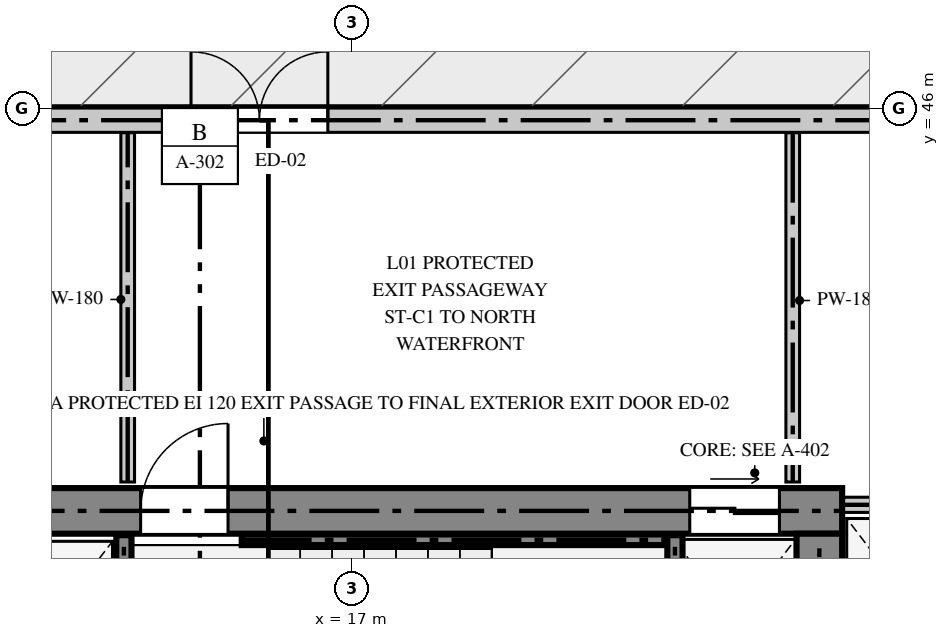
"""IFC4 building model, lengths in metres.
Left out: names, types, materials, properties, quantities, classifications, styles, units other than length and angle.
Written with IfcOpenShell. Run it as: python <this file> out.ifc"""

import sys

from ifc_helpers import new_model, si_unit, direction, frame, frame_2d, origin, place, context, subcontext, project, spatial, rectangle, extrude, element, fill, save


model = new_model("IFC4")
c1 = context("Model", 3, precision=1e-05, world=origin(), true_north=direction((0.0, 1.0)))
c2 = subcontext(c1, "Body", "Model", "MODEL_VIEW")
j1 = project(units=[si_unit("LENGTHUNIT", "METRE"), si_unit("PLANEANGLEUNIT", "RADIAN")], contexts=[c1])
p1 = place(None, origin())
s1 = spatial("IfcSite", under=j1, at=p1, CompositionType="ELEMENT")
p2 = place(p1, origin())
s2 = spatial("IfcBuilding", under=s1, at=p2, CompositionType="ELEMENT")
p3 = place(p2, origin())
s3 = spatial("IfcBuildingStorey", under=s2, at=p3, CompositionType="ELEMENT", Elevation=0.0)
p4 = place(p3, frame((5.4, 40.7, 0.0), z_axis=(0.0, 0.0, 1.0), x_axis=(1.0, 0.0, 0.0)))
e1 = element("IfcWall", 1, at=p4, inside=s3, PredefinedType="SHEAR", context=c2, shape_type="SweptSolid", body=[
    extrude(rectangle(XDim=18.05, YDim=0.6, at=frame_2d((9.025, 0.0))), origin(), (0.0, 0.0, 1.0), 5.4),
])
p5 = place(p4, frame((8.82, 0.0, 0.0)))
e2 = element("IfcOpeningElement", 2, at=p5, cuts=e1, PredefinedType="OPENING", context=c2, shape_type="SweptSolid", body=[
    extrude(rectangle(XDim=1.15, YDim=2.2, at=frame_2d((0.575, 1.1))), frame((0.0, 0.31, 0.0), z_axis=(0.0, -1.0, 0.0), x_axis=(1.0, 0.0, 0.0)), (0.0, 0.0, 1.0), 0.62),
])
p6 = place(p4, frame((16.045, 0.0, 0.0)))
e3 = element("IfcOpeningElement", 3, at=p6, cuts=e1, PredefinedType="OPENING", context=c2, shape_type="SweptSolid", body=[
    extrude(rectangle(XDim=1.18, YDim=2.25, at=frame_2d((0.59, 1.125))), frame((0.0, 0.31, 0.0), z_axis=(0.0, -1.0, 0.0), x_axis=(1.0, 0.0, 0.0)), (0.0, 0.0, 1.0), 0.62),
])
p7 = place(p3, frame((23.15, 32.1, 0.0), z_axis=(0.0, 0.0, 1.0), x_axis=(0.0, 1.0, 0.0)))
e4 = element("IfcWall", 4, at=p7, inside=s3, PredefinedType="SHEAR", context=c2, shape_type="SweptSolid", body=[
    extrude(rectangle(XDim=8.3, YDim=0.6, at=frame_2d((4.15, 0.0))), origin(), (0.0, 0.0, 1.0), 5.4),
])
for number, where, z_axis, x_axis in (
    (5, (14.0, 32.12, 0.0), (0.0, 0.0, 1.0), (0.0, 1.0, 0.0)),
    (6, (21.25, 32.12, 0.0), (0.0, 0.0, 1.0), (0.0, 1.0, 0.0)),
):
    element("IfcWall", number, at=place(p3, frame(where, z_axis=z_axis, x_axis=x_axis)), inside=s3, PredefinedType="SHEAR", context=c2, shape_type="SweptSolid", body=[
        extrude(rectangle(XDim=8.26, YDim=0.2, at=frame_2d((4.13, 0.0))), origin(), (0.0, 0.0, 1.0), 5.4),
    ])
p8 = place(p3, frame((15.55, 40.32, 0.0), z_axis=(0.0, 0.0, 1.0), x_axis=(1.0, 0.0, 0.0)))
e7 = element("IfcWall", 7, at=p8, inside=s3, PredefinedType="SHEAR", context=c2, shape_type="SweptSolid", body=[
    extrude(rectangle(XDim=5.58, YDim=0.14, at=frame_2d((2.79, 0.0))), origin(), (0.0, 0.0, 1.0), 5.4),
])
p9 = place(p3, frame((2.66, 45.84, 0.0), z_axis=(0.0, 0.0, 1.0), x_axis=(1.0, 0.0, 0.0)))
e8 = element("IfcWall", 8, at=p9, inside=s3, PredefinedType="STANDARD", context=c2, shape_type="SweptSolid", body=[
    extrude(rectangle(XDim=54.68, YDim=0.32, at=frame_2d((27.34, 0.0))), origin(), (0.0, 0.0, 1.0), 5.08),
])
p10 = place(p9, frame((12.223, 0.0, 0.0)))
e9 = element("IfcOpeningElement", 9, at=p10, cuts=e8, PredefinedType="OPENING", context=c2, shape_type="SweptSolid", body=[
    extrude(rectangle(XDim=1.8, YDim=2.4, at=frame_2d((0.9, 1.2))), frame((0.0, 0.17, 0.0), z_axis=(0.0, -1.0, 0.0), x_axis=(1.0, 0.0, 0.0)), (0.0, 0.0, 1.0), 0.34),
])
p11 = place(p3, frame((23.47, 40.78, 0.0), z_axis=(0.0, 0.0, 1.0), x_axis=(1.0, 0.0, 0.0)))
e10 = element("IfcWall", 10, at=p11, inside=s3, PredefinedType="PARTITIONING", context=c2, shape_type="SweptSolid", body=[
    extrude(rectangle(XDim=6.91, YDim=0.2, at=frame_2d((3.455, 0.0))), origin(), (0.0, 0.0, 1.0), 5.08),
])
for number, where, z_axis, x_axis in (
    (11, (22.8, 45.675, 0.0), (0.0, 0.0, 1.0), (0.0, -1.0, 0.0)),
    (12, (14.05, 41.08, 0.0), (0.0, 0.0, 1.0), (0.0, 1.0, 0.0)),
):
    element("IfcWall", number, at=place(p3, frame(where, z_axis=z_axis, x_axis=x_axis)), inside=s3, PredefinedType="PARTITIONING", context=c2, shape_type="SweptSolid", body=[
        extrude(rectangle(XDim=4.595, YDim=0.18, at=frame_2d((2.297, 0.0))), origin(), (0.0, 0.0, 1.0), 5.08),
    ])
p12 = place(p10, origin())
e13 = element("IfcDoor", 13, at=p12, inside=s3, OperationType="DOUBLE_DOOR_SINGLE_SWING", PredefinedType="DOOR", context=c2, shape_type="SweptSolid", body=[
    extrude(rectangle(XDim=1.8, YDim=2.4, at=frame_2d((0.9, 1.2))), frame((0.0, 0.025, 0.0), z_axis=(0.0, -1.0, 0.0), x_axis=(1.0, 0.0, 0.0)), (0.0, 0.0, 1.0), 0.05),
])
fill(e9, e13)
p13 = place(p5, origin())
e14 = element("IfcDoor", 14, at=p13, inside=s3, OperationType="SINGLE_SWING_RIGHT", PredefinedType="DOOR", context=c2, shape_type="SweptSolid", body=[
    extrude(rectangle(XDim=1.15, YDim=2.2, at=frame_2d((0.575, 1.1))), frame((0.0, 0.025, 0.0), z_axis=(0.0, -1.0, 0.0), x_axis=(1.0, 0.0, 0.0)), (0.0, 0.0, 1.0), 0.05),
])
fill(e2, e14)
p14 = place(p6, origin())
e15 = element("IfcDoor", 15, at=p14, inside=s3, OperationType="DOUBLE_DOOR_SLIDING", PredefinedType="DOOR", context=c2, shape_type="SweptSolid", body=[
    extrude(rectangle(XDim=1.18, YDim=2.25, at=frame_2d((0.59, 1.125))), frame((0.0, 0.025, 0.0), z_axis=(0.0, -1.0, 0.0), x_axis=(1.0, 0.0, 0.0)), (0.0, 0.0, 1.0), 0.05),
])
fill(e3, e15)
save(model, sys.argv[1])
